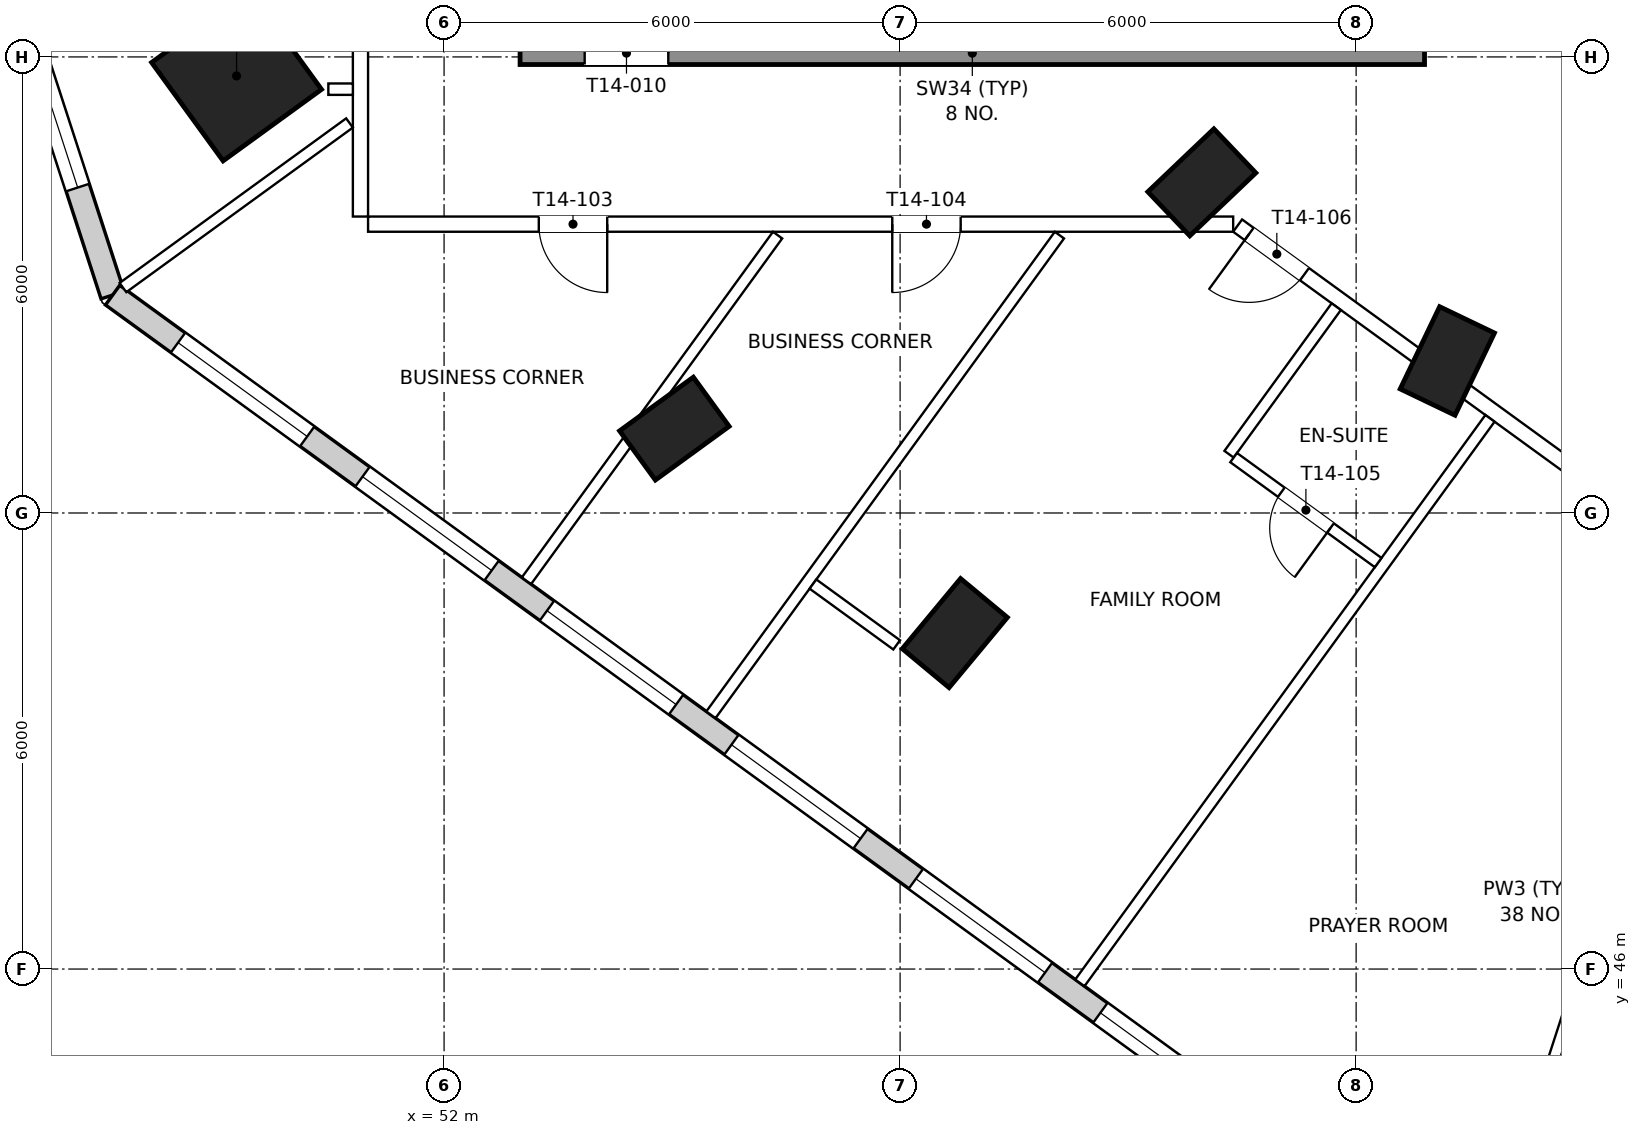
"""IFC4 building model, lengths in metres.
Left out: names, types, materials, properties, quantities, classifications, styles, units other than length and angle.
Written with IfcOpenShell. Run it as: python <this file> out.ifc"""

import sys

from ifc_helpers import new_model, si_unit, direction, frame, frame_2d, origin, origin_2d, place, context, subcontext, project, spatial, rectangle, extrude, element, fill, save


model = new_model("IFC4")
c1 = context("Model", 3, precision=1e-05, world=origin(), true_north=direction((0.0, 1.0)))
c2 = subcontext(c1, "Body", "Model", "MODEL_VIEW")
j1 = project(units=[si_unit("LENGTHUNIT", "METRE"), si_unit("PLANEANGLEUNIT", "RADIAN")], contexts=[c1])
p1 = place(None, origin())
s1 = spatial("IfcSite", under=j1, at=p1, CompositionType="ELEMENT")
p2 = place(p1, origin())
s2 = spatial("IfcBuilding", under=s1, at=p2, CompositionType="ELEMENT")
p3 = place(p2, frame((0.0, 0.0, 204.3)))
s3 = spatial("IfcBuildingStorey", under=s2, at=p3, CompositionType="ELEMENT", Elevation=204.3)
p4 = place(p3, frame((49.27, 57.75, 0.0), z_axis=(0.0, 0.0, 1.0), x_axis=(-0.809016994375, -0.587785252292, 0.0)))
e1 = element("IfcColumn", 1, at=p4, inside=s3, PredefinedType="COLUMN", context=c2, shape_type="SweptSolid", body=[
    extrude(rectangle(XDim=1.6, YDim=1.6, at=origin_2d()), origin(), (0.0, 0.0, 1.0), 3.9),
])
for number, where, z_axis, x_axis in (
    (2, (55.03, 53.11, 0.0), (0.0, 0.0, 1.0), (-0.588, 0.809, 0.0)),
    (3, (58.72, 50.42, 0.0), (0.0, 0.0, 1.0), (-0.769, 0.639, 0.0)),
    (4, (61.97, 56.35, 0.0), (0.0, 0.0, 1.0), (-0.69, 0.724, 0.0)),
    (5, (65.2, 54.0, 0.0), (0.0, 0.0, 1.0), (-0.902, 0.432, 0.0)),
):
    element("IfcColumn", number, at=place(p3, frame(where, z_axis=z_axis, x_axis=x_axis)), inside=s3, PredefinedType="COLUMN", context=c2, shape_type="SweptSolid", body=[
        extrude(rectangle(XDim=0.8, YDim=1.2, at=origin_2d()), origin(), (0.0, 0.0, 1.0), 3.9),
    ])
p5 = place(p3, frame((45.113, 62.642, 0.0), z_axis=(0.0, 0.0, 1.0), x_axis=(0.309006387978, -0.951059962457, 0.0)))
e6 = element("IfcWall", 6, at=p5, inside=s3, PredefinedType="SOLIDWALL", context=c2, shape_type="SweptSolid", body=[
    extrude(rectangle(XDim=8.175, YDim=0.32, at=frame_2d((4.087, 0.0))), origin(), (0.0, 0.0, 1.0), 3.6),
])
p6 = place(p5, frame((1.488, 0.0, 0.75)))
e7 = element("IfcOpeningElement", 7, at=p6, cuts=e6, PredefinedType="OPENING", context=c2, shape_type="SweptSolid", body=[
    extrude(rectangle(XDim=2.2, YDim=2.1, at=frame_2d((1.1, 1.05))), frame((0.0, 0.17, 0.0), z_axis=(0.0, -1.0, 0.0), x_axis=(1.0, 0.0, 0.0)), (0.0, 0.0, 1.0), 0.34),
])
p7 = place(p5, frame((4.488, 0.0, 0.75)))
e8 = element("IfcOpeningElement", 8, at=p7, cuts=e6, PredefinedType="OPENING", context=c2, shape_type="SweptSolid", body=[
    extrude(rectangle(XDim=2.2, YDim=2.1, at=frame_2d((1.1, 1.05))), frame((0.0, 0.17, 0.0), z_axis=(0.0, -1.0, 0.0), x_axis=(1.0, 0.0, 0.0)), (0.0, 0.0, 1.0), 0.34),
])
p8 = place(p3, frame((47.639, 54.867, 0.0), z_axis=(0.0, 0.0, 1.0), x_axis=(0.809017634756, -0.587784370883, 0.0)))
e9 = element("IfcWall", 9, at=p8, inside=s3, PredefinedType="SOLIDWALL", context=c2, shape_type="SweptSolid", body=[
    extrude(rectangle(XDim=22.229, YDim=0.32, at=frame_2d((11.114, 0.0))), origin(), (0.0, 0.0, 1.0), 3.6),
])
p9 = place(p8, frame((1.064, 0.0, 0.75)))
e10 = element("IfcOpeningElement", 10, at=p9, cuts=e9, PredefinedType="OPENING", context=c2, shape_type="SweptSolid", body=[
    extrude(rectangle(XDim=2.1, YDim=2.1, at=frame_2d((1.05, 1.05))), frame((0.0, 0.17, 0.0), z_axis=(0.0, -1.0, 0.0), x_axis=(1.0, 0.0, 0.0)), (0.0, 0.0, 1.0), 0.34),
])
p10 = place(p8, frame((4.064, 0.0, 0.75)))
e11 = element("IfcOpeningElement", 11, at=p10, cuts=e9, PredefinedType="OPENING", context=c2, shape_type="SweptSolid", body=[
    extrude(rectangle(XDim=2.1, YDim=2.1, at=frame_2d((1.05, 1.05))), frame((0.0, 0.17, 0.0), z_axis=(0.0, -1.0, 0.0), x_axis=(1.0, 0.0, 0.0)), (0.0, 0.0, 1.0), 0.34),
])
p11 = place(p8, frame((7.064, 0.0, 0.75)))
e12 = element("IfcOpeningElement", 12, at=p11, cuts=e9, PredefinedType="OPENING", context=c2, shape_type="SweptSolid", body=[
    extrude(rectangle(XDim=2.1, YDim=2.1, at=frame_2d((1.05, 1.05))), frame((0.0, 0.17, 0.0), z_axis=(0.0, -1.0, 0.0), x_axis=(1.0, 0.0, 0.0)), (0.0, 0.0, 1.0), 0.34),
])
p12 = place(p8, frame((10.064, 0.0, 0.75)))
e13 = element("IfcOpeningElement", 13, at=p12, cuts=e9, PredefinedType="OPENING", context=c2, shape_type="SweptSolid", body=[
    extrude(rectangle(XDim=2.1, YDim=2.1, at=frame_2d((1.05, 1.05))), frame((0.0, 0.17, 0.0), z_axis=(0.0, -1.0, 0.0), x_axis=(1.0, 0.0, 0.0)), (0.0, 0.0, 1.0), 0.34),
])
p13 = place(p8, frame((13.064, 0.0, 0.75)))
e14 = element("IfcOpeningElement", 14, at=p13, cuts=e9, PredefinedType="OPENING", context=c2, shape_type="SweptSolid", body=[
    extrude(rectangle(XDim=2.1, YDim=2.1, at=frame_2d((1.05, 1.05))), frame((0.0, 0.17, 0.0), z_axis=(0.0, -1.0, 0.0), x_axis=(1.0, 0.0, 0.0)), (0.0, 0.0, 1.0), 0.34),
])
p14 = place(p8, frame((16.064, 0.0, 0.75)))
e15 = element("IfcOpeningElement", 15, at=p14, cuts=e9, PredefinedType="OPENING", context=c2, shape_type="SweptSolid", body=[
    extrude(rectangle(XDim=2.1, YDim=2.1, at=frame_2d((1.05, 1.05))), frame((0.0, 0.17, 0.0), z_axis=(0.0, -1.0, 0.0), x_axis=(1.0, 0.0, 0.0)), (0.0, 0.0, 1.0), 0.34),
])
p15 = place(p8, frame((19.064, 0.0, 0.75)))
e16 = element("IfcOpeningElement", 16, at=p15, cuts=e9, PredefinedType="OPENING", context=c2, shape_type="SweptSolid", body=[
    extrude(rectangle(XDim=2.1, YDim=2.1, at=frame_2d((1.05, 1.05))), frame((0.0, 0.17, 0.0), z_axis=(0.0, -1.0, 0.0), x_axis=(1.0, 0.0, 0.0)), (0.0, 0.0, 1.0), 0.34),
])
p16 = place(p3, frame((53.0, 58.05, 0.0), z_axis=(0.0, 0.0, 1.0), x_axis=(1.0, 0.0, 0.0)))
e17 = element("IfcWall", 17, at=p16, inside=s3, PredefinedType="SHEAR", context=c2, shape_type="SweptSolid", body=[
    extrude(rectangle(XDim=11.9, YDim=0.3, at=frame_2d((5.95, 0.0))), origin(), (0.0, 0.0, 1.0), 3.9),
])
p17 = place(p16, frame((0.85, 0.0, 0.0)))
e18 = element("IfcOpeningElement", 18, at=p17, cuts=e17, PredefinedType="OPENING", context=c2, shape_type="SweptSolid", body=[
    extrude(rectangle(XDim=1.1, YDim=2.1, at=frame_2d((0.55, 1.05))), frame((0.0, 0.16, 0.0), z_axis=(0.0, -1.0, 0.0), x_axis=(1.0, 0.0, 0.0)), (0.0, 0.0, 1.0), 0.32),
])
p18 = place(p3, frame((68.663, 51.26, 0.0), z_axis=(0.0, 0.0, 1.0), x_axis=(-0.80901190539, 0.587792256616, 0.0)))
e19 = element("IfcWall", 19, at=p18, inside=s3, PredefinedType="PARTITIONING", context=c2, shape_type="SweptSolid", body=[
    extrude(rectangle(XDim=7.691, YDim=0.2, at=frame_2d((3.846, 0.0))), origin(), (0.0, 0.0, 1.0), 3.05),
])
p19 = place(p18, frame((6.604, 0.0, 0.0)))
e20 = element("IfcOpeningElement", 20, at=p19, cuts=e19, PredefinedType="OPENING", context=c2, shape_type="SweptSolid", body=[
    extrude(rectangle(XDim=0.9, YDim=2.1, at=frame_2d((0.45, 1.05))), frame((0.0, 0.11, 0.0), z_axis=(0.0, -1.0, 0.0), x_axis=(1.0, 0.0, 0.0)), (0.0, 0.0, 1.0), 0.22),
])
p20 = place(p18, frame((1.291, 0.0, 0.0)))
e21 = element("IfcOpeningElement", 21, at=p20, cuts=e19, PredefinedType="OPENING", context=c2, shape_type="SweptSolid", body=[
    extrude(rectangle(XDim=0.9, YDim=2.1, at=frame_2d((0.45, 1.05))), frame((0.0, 0.11, 0.0), z_axis=(0.0, -1.0, 0.0), x_axis=(1.0, 0.0, 0.0)), (0.0, 0.0, 1.0), 0.22),
])
p21 = place(p3, frame((62.382, 55.8, 0.0), z_axis=(0.0, 0.0, 1.0), x_axis=(-1.0, 0.0, 0.0)))
e22 = element("IfcWall", 22, at=p21, inside=s3, PredefinedType="PARTITIONING", context=c2, shape_type="SweptSolid", body=[
    extrude(rectangle(XDim=11.382, YDim=0.2, at=frame_2d((5.691, 0.0))), origin(), (0.0, 0.0, 1.0), 3.15),
])
p22 = place(p21, frame((8.236, 0.0, 0.0)))
e23 = element("IfcOpeningElement", 23, at=p22, cuts=e22, PredefinedType="OPENING", context=c2, shape_type="SweptSolid", body=[
    extrude(rectangle(XDim=0.9, YDim=2.1, at=frame_2d((0.45, 1.05))), frame((0.0, 0.11, 0.0), z_axis=(0.0, -1.0, 0.0), x_axis=(1.0, 0.0, 0.0)), (0.0, 0.0, 1.0), 0.22),
])
p23 = place(p21, frame((3.585, 0.0, 0.0)))
e24 = element("IfcOpeningElement", 24, at=p23, cuts=e22, PredefinedType="OPENING", context=c2, shape_type="SweptSolid", body=[
    extrude(rectangle(XDim=0.9, YDim=2.1, at=frame_2d((0.45, 1.05))), frame((0.0, 0.11, 0.0), z_axis=(0.0, -1.0, 0.0), x_axis=(1.0, 0.0, 0.0)), (0.0, 0.0, 1.0), 0.22),
])
p24 = place(p3, frame((50.9, 55.9, 0.0), z_axis=(0.0, 0.0, 1.0), x_axis=(0.0, 1.0, 0.0)))
e25 = element("IfcWall", 25, at=p24, inside=s3, PredefinedType="PARTITIONING", context=c2, shape_type="SweptSolid", body=[
    extrude(rectangle(XDim=7.95, YDim=0.2, at=frame_2d((3.975, 0.0))), origin(), (0.0, 0.0, 1.0), 3.15),
])
p25 = place(p24, frame((2.614, 0.0, 0.0)))
e26 = element("IfcOpeningElement", 26, at=p25, cuts=e25, PredefinedType="OPENING", context=c2, shape_type="SweptSolid", body=[
    extrude(rectangle(XDim=0.9, YDim=2.1, at=frame_2d((0.45, 1.05))), frame((0.0, 0.11, 0.0), z_axis=(0.0, -1.0, 0.0), x_axis=(1.0, 0.0, 0.0)), (0.0, 0.0, 1.0), 0.22),
])
p26 = place(p3, frame((47.775, 54.966, 0.0), z_axis=(0.0, 0.0, 1.0), x_axis=(0.809028266422, 0.587769737338, 0.0)))
e27 = element("IfcWall", 27, at=p26, inside=s3, PredefinedType="PARTITIONING", context=c2, shape_type="SweptSolid", body=[
    extrude(rectangle(XDim=3.684, YDim=0.15, at=frame_2d((1.842, 0.0))), origin(), (0.0, 0.0, 1.0), 3.15),
])
p27 = place(p3, frame((65.674, 41.961, 0.0), z_axis=(0.0, 0.0, 1.0), x_axis=(0.309002171774, 0.951061332322, 0.0)))
e28 = element("IfcWall", 28, at=p27, inside=s3, PredefinedType="PARTITIONING", context=c2, shape_type="SweptSolid", body=[
    extrude(rectangle(XDim=9.672, YDim=0.15, at=frame_2d((4.836, 0.0))), origin(), (0.0, 0.0, 1.0), 3.6),
])
p28 = place(p3, frame((53.084, 51.108, 0.0), z_axis=(0.0, 0.0, 1.0), x_axis=(0.587804932614, 0.809002695419, 0.0)))
e29 = element("IfcWall", 29, at=p28, inside=s3, PredefinedType="PARTITIONING", context=c2, shape_type="SweptSolid", body=[
    extrude(rectangle(XDim=5.621, YDim=0.15, at=frame_2d((2.811, 0.0))), origin(), (0.0, 0.0, 1.0), 3.15),
])
p29 = place(p3, frame((55.511, 49.345, 0.0), z_axis=(0.0, 0.0, 1.0), x_axis=(0.587782705134, 0.809018844988, 0.0)))
e30 = element("IfcWall", 30, at=p29, inside=s3, PredefinedType="PARTITIONING", context=c2, shape_type="SweptSolid", body=[
    extrude(rectangle(XDim=7.801, YDim=0.15, at=frame_2d((3.9, 0.0))), origin(), (0.0, 0.0, 1.0), 3.15),
])
p30 = place(p3, frame((60.365, 45.818, 0.0), z_axis=(0.0, 0.0, 1.0), x_axis=(0.587777877013, 0.809022352778, 0.0)))
e31 = element("IfcWall", 31, at=p30, inside=s3, PredefinedType="PARTITIONING", context=c2, shape_type="SweptSolid", body=[
    extrude(rectangle(XDim=9.18, YDim=0.15, at=frame_2d((4.59, 0.0))), origin(), (0.0, 0.0, 1.0), 3.6),
])
p31 = place(p3, frame((63.739, 54.715, 0.0), z_axis=(0.0, 0.0, 1.0), x_axis=(-0.587772420479, -0.809026317077, 0.0)))
e32 = element("IfcWall", 32, at=p31, inside=s3, PredefinedType="PARTITIONING", context=c2, shape_type="SweptSolid", body=[
    extrude(rectangle(XDim=2.4, YDim=0.15, at=frame_2d((1.2, 0.0))), origin(), (0.0, 0.0, 1.0), 3.6),
])
p32 = place(p3, frame((64.29, 51.347, 0.0), z_axis=(0.0, 0.0, 1.0), x_axis=(-0.808996573949, 0.587813357571, 0.0)))
e33 = element("IfcWall", 33, at=p32, inside=s3, PredefinedType="PARTITIONING", context=c2, shape_type="SweptSolid", body=[
    extrude(rectangle(XDim=2.35, YDim=0.15, at=frame_2d((1.175, 0.0))), origin(), (0.0, 0.0, 1.0), 3.6),
])
p33 = place(p32, frame((0.775, 0.0, 0.0)))
e34 = element("IfcOpeningElement", 34, at=p33, cuts=e33, PredefinedType="OPENING", context=c2, shape_type="SweptSolid", body=[
    extrude(rectangle(XDim=0.8, YDim=2.1, at=frame_2d((0.4, 1.05))), frame((0.0, 0.085, 0.0), z_axis=(0.0, -1.0, 0.0), x_axis=(1.0, 0.0, 0.0)), (0.0, 0.0, 1.0), 0.17),
])
p34 = place(p3, frame((50.477, 57.576, 0.0), z_axis=(0.0, 0.0, 1.0), x_axis=(1.0, 0.0, 0.0)))
e35 = element("IfcWall", 35, at=p34, inside=s3, PredefinedType="PARTITIONING", context=c2, shape_type="SweptSolid", body=[
    extrude(rectangle(XDim=0.323, YDim=0.15, at=frame_2d((0.161, 0.0))), origin(), (0.0, 0.0, 1.0), 3.6),
])
p35 = place(p3, frame((57.955, 50.265, 0.0), z_axis=(0.0, 0.0, 1.0), x_axis=(-0.809053951213, 0.587734382205, 0.0)))
e36 = element("IfcWall", 36, at=p35, inside=s3, PredefinedType="PARTITIONING", context=c2, shape_type="SweptSolid", body=[
    extrude(rectangle(XDim=1.361, YDim=0.15, at=frame_2d((0.681, 0.0))), origin(), (0.0, 0.0, 1.0), 3.6),
])
p36 = place(p7, origin())
e37 = element("IfcWindow", 37, at=p36, inside=s3, PartitioningType="SINGLE_PANEL", PredefinedType="WINDOW", context=c2, shape_type="SweptSolid", body=[
    extrude(rectangle(XDim=2.2, YDim=2.1, at=frame_2d((1.1, 1.05))), frame((0.0, 0.07, 0.0), z_axis=(0.0, -1.0, 0.0), x_axis=(1.0, 0.0, 0.0)), (0.0, 0.0, 1.0), 0.06),
])
fill(e8, e37)
p37 = place(p9, origin())
e38 = element("IfcWindow", 38, at=p37, inside=s3, PartitioningType="SINGLE_PANEL", PredefinedType="WINDOW", context=c2, shape_type="SweptSolid", body=[
    extrude(rectangle(XDim=2.1, YDim=2.1, at=frame_2d((1.05, 1.05))), frame((0.0, 0.07, 0.0), z_axis=(0.0, -1.0, 0.0), x_axis=(1.0, 0.0, 0.0)), (0.0, 0.0, 1.0), 0.06),
])
fill(e10, e38)
p38 = place(p10, origin())
e39 = element("IfcWindow", 39, at=p38, inside=s3, PartitioningType="SINGLE_PANEL", PredefinedType="WINDOW", context=c2, shape_type="SweptSolid", body=[
    extrude(rectangle(XDim=2.1, YDim=2.1, at=frame_2d((1.05, 1.05))), frame((0.0, 0.07, 0.0), z_axis=(0.0, -1.0, 0.0), x_axis=(1.0, 0.0, 0.0)), (0.0, 0.0, 1.0), 0.06),
])
fill(e11, e39)
p39 = place(p11, origin())
e40 = element("IfcWindow", 40, at=p39, inside=s3, PartitioningType="SINGLE_PANEL", PredefinedType="WINDOW", context=c2, shape_type="SweptSolid", body=[
    extrude(rectangle(XDim=2.1, YDim=2.1, at=frame_2d((1.05, 1.05))), frame((0.0, 0.07, 0.0), z_axis=(0.0, -1.0, 0.0), x_axis=(1.0, 0.0, 0.0)), (0.0, 0.0, 1.0), 0.06),
])
fill(e12, e40)
p40 = place(p12, origin())
e41 = element("IfcWindow", 41, at=p40, inside=s3, PartitioningType="SINGLE_PANEL", PredefinedType="WINDOW", context=c2, shape_type="SweptSolid", body=[
    extrude(rectangle(XDim=2.1, YDim=2.1, at=frame_2d((1.05, 1.05))), frame((0.0, 0.07, 0.0), z_axis=(0.0, -1.0, 0.0), x_axis=(1.0, 0.0, 0.0)), (0.0, 0.0, 1.0), 0.06),
])
fill(e13, e41)
p41 = place(p13, origin())
e42 = element("IfcWindow", 42, at=p41, inside=s3, PartitioningType="SINGLE_PANEL", PredefinedType="WINDOW", context=c2, shape_type="SweptSolid", body=[
    extrude(rectangle(XDim=2.1, YDim=2.1, at=frame_2d((1.05, 1.05))), frame((0.0, 0.07, 0.0), z_axis=(0.0, -1.0, 0.0), x_axis=(1.0, 0.0, 0.0)), (0.0, 0.0, 1.0), 0.06),
])
fill(e14, e42)
p42 = place(p14, origin())
e43 = element("IfcWindow", 43, at=p42, inside=s3, PartitioningType="SINGLE_PANEL", PredefinedType="WINDOW", context=c2, shape_type="SweptSolid", body=[
    extrude(rectangle(XDim=2.1, YDim=2.1, at=frame_2d((1.05, 1.05))), frame((0.0, 0.07, 0.0), z_axis=(0.0, -1.0, 0.0), x_axis=(1.0, 0.0, 0.0)), (0.0, 0.0, 1.0), 0.06),
])
fill(e15, e43)
p43 = place(p17, origin())
e44 = element("IfcDoor", 44, at=p43, inside=s3, OperationType="SINGLE_SWING_RIGHT", PredefinedType="DOOR", context=c2, shape_type="SweptSolid", body=[
    extrude(rectangle(XDim=1.1, YDim=2.1, at=frame_2d((0.55, 1.05))), frame((0.0, 0.025, 0.0), z_axis=(0.0, -1.0, 0.0), x_axis=(1.0, 0.0, 0.0)), (0.0, 0.0, 1.0), 0.05),
])
fill(e18, e44)
p44 = place(p22, origin())
e45 = element("IfcDoor", 45, at=p44, inside=s3, OperationType="SINGLE_SWING_LEFT", PredefinedType="DOOR", context=c2, shape_type="SweptSolid", body=[
    extrude(rectangle(XDim=0.9, YDim=2.1, at=frame_2d((0.45, 1.05))), frame((0.0, 0.025, 0.0), z_axis=(0.0, -1.0, 0.0), x_axis=(1.0, 0.0, 0.0)), (0.0, 0.0, 1.0), 0.05),
])
fill(e23, e45)
p45 = place(p23, origin())
e46 = element("IfcDoor", 46, at=p45, inside=s3, OperationType="SINGLE_SWING_RIGHT", PredefinedType="DOOR", context=c2, shape_type="SweptSolid", body=[
    extrude(rectangle(XDim=0.9, YDim=2.1, at=frame_2d((0.45, 1.05))), frame((0.0, 0.025, 0.0), z_axis=(0.0, -1.0, 0.0), x_axis=(1.0, 0.0, 0.0)), (0.0, 0.0, 1.0), 0.05),
])
fill(e24, e46)
p46 = place(p33, origin())
e47 = element("IfcDoor", 47, at=p46, inside=s3, OperationType="SINGLE_SWING_LEFT", PredefinedType="DOOR", context=c2, shape_type="SweptSolid", body=[
    extrude(rectangle(XDim=0.8, YDim=2.1, at=frame_2d((0.4, 1.05))), frame((0.0, 0.025, 0.0), z_axis=(0.0, -1.0, 0.0), x_axis=(1.0, 0.0, 0.0)), (0.0, 0.0, 1.0), 0.05),
])
fill(e34, e47)
p47 = place(p19, origin())
e48 = element("IfcDoor", 48, at=p47, inside=s3, OperationType="SINGLE_SWING_RIGHT", PredefinedType="DOOR", context=c2, shape_type="SweptSolid", body=[
    extrude(rectangle(XDim=0.9, YDim=2.1, at=frame_2d((0.45, 1.05))), frame((0.0, 0.025, 0.0), z_axis=(0.0, -1.0, 0.0), x_axis=(1.0, 0.0, 0.0)), (0.0, 0.0, 1.0), 0.05),
])
fill(e20, e48)
save(model, sys.argv[1])
